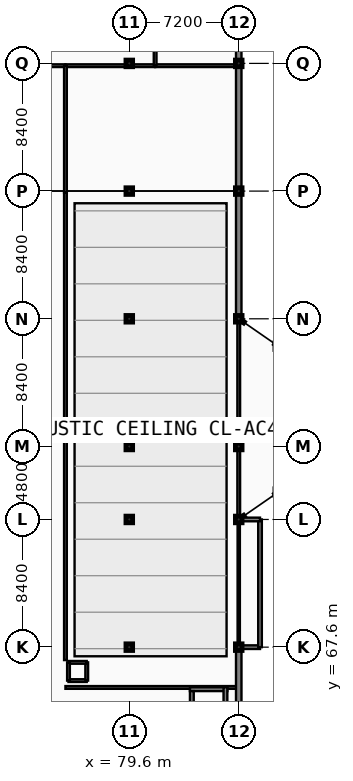
"""IFC4 building model, lengths in metres.
Left out: names, types, materials, properties, quantities, classifications, styles, units other than length and angle.
Written with IfcOpenShell. Run it as: python <this file> out.ifc"""

import sys

from ifc_helpers import new_model, si_unit, direction, frame, frame_2d, origin, origin_2d, place, context, subcontext, project, spatial, rectangle, extrude, element, fill, save


model = new_model("IFC4")
c1 = context("Model", 3, precision=1e-05, world=origin(), true_north=direction((0.0, 1.0)))
c2 = subcontext(c1, "Body", "Model", "MODEL_VIEW")
j1 = project(units=[si_unit("LENGTHUNIT", "METRE"), si_unit("PLANEANGLEUNIT", "RADIAN")], contexts=[c1])
p1 = place(None, origin())
s1 = spatial("IfcSite", under=j1, at=p1, CompositionType="ELEMENT")
p2 = place(p1, origin())
s2 = spatial("IfcBuilding", under=s1, at=p2, CompositionType="ELEMENT")
p3 = place(p2, frame((0.0, 0.0, 9.6)))
s3 = spatial("IfcBuildingStorey", under=s2, at=p3, CompositionType="ELEMENT", Elevation=9.6)
for number, where, z_axis, x_axis in (
    (1, (79.6, 67.6, 0.0), (0.0, 0.0, 1.0), (1.0, 0.0, 0.0)),
    (2, (79.6, 76.0, 0.0), (0.0, 0.0, 1.0), (1.0, 0.0, 0.0)),
    (3, (79.6, 80.8, 0.0), (0.0, 0.0, 1.0), (1.0, 0.0, 0.0)),
    (4, (79.6, 89.2, 0.0), (0.0, 0.0, 1.0), (1.0, 0.0, 0.0)),
    (5, (79.6, 97.6, 0.0), (0.0, 0.0, 1.0), (1.0, 0.0, 0.0)),
    (6, (79.6, 106.0, 0.0), (0.0, 0.0, 1.0), (1.0, 0.0, 0.0)),
    (7, (86.8, 67.6, 0.0), (0.0, 0.0, 1.0), (1.0, 0.0, 0.0)),
    (8, (86.8, 76.0, 0.0), (0.0, 0.0, 1.0), (1.0, 0.0, 0.0)),
    (9, (86.8, 80.8, 0.0), (0.0, 0.0, 1.0), (1.0, 0.0, 0.0)),
    (10, (86.8, 89.2, 0.0), (0.0, 0.0, 1.0), (1.0, 0.0, 0.0)),
    (11, (86.8, 97.6, 0.0), (0.0, 0.0, 1.0), (1.0, 0.0, 0.0)),
    (12, (86.8, 106.0, 0.0), (0.0, 0.0, 1.0), (1.0, 0.0, 0.0)),
):
    element("IfcColumn", number, at=place(p3, frame(where, z_axis=z_axis, x_axis=x_axis)), inside=s3, PredefinedType="COLUMN", context=c2, shape_type="SweptSolid", body=[
        extrude(rectangle(XDim=0.44, YDim=0.44, at=origin_2d()), origin(), (0.0, 0.0, 1.0), 4.2),
    ])
p4 = place(p3, frame((86.8, 67.6, 0.0), z_axis=(0.0, 0.0, 1.0), x_axis=(0.0, 1.0, 0.0)))
e13 = element("IfcWall", 13, at=p4, inside=s3, PredefinedType="PARTITIONING", context=c2, shape_type="SweptSolid", body=[
    extrude(rectangle(XDim=8.4, YDim=0.15, at=frame_2d((4.2, 0.0))), origin(), (0.0, 0.0, 1.0), 3.27),
])
p5 = place(p4, frame((3.7, 0.0, -0.01)))
e14 = element("IfcOpeningElement", 14, at=p5, cuts=e13, PredefinedType="OPENING", context=c2, shape_type="SweptSolid", body=[
    extrude(rectangle(XDim=1.0, YDim=2.16, at=frame_2d((0.5, 1.08))), frame((0.0, 0.085, 0.0), z_axis=(0.0, -1.0, 0.0), x_axis=(1.0, 0.0, 0.0)), (0.0, 0.0, 1.0), 0.17),
])
p6 = place(p3, frame((60.3, 105.85, 0.0), z_axis=(0.0, 0.0, 1.0), x_axis=(1.0, 0.0, 0.0)))
e15 = element("IfcWall", 15, at=p6, inside=s3, PredefinedType="PARTITIONING", context=c2, shape_type="SweptSolid", body=[
    extrude(rectangle(XDim=15.1, YDim=0.18, at=frame_2d((7.55, 0.0))), origin(), (0.0, 0.0, 1.0), 3.25),
])
p7 = place(p6, frame((7.05, 0.0, -0.01)))
e16 = element("IfcOpeningElement", 16, at=p7, cuts=e15, PredefinedType="OPENING", context=c2, shape_type="SweptSolid", body=[
    extrude(rectangle(XDim=1.0, YDim=2.16, at=frame_2d((0.5, 1.08))), frame((0.0, 0.1, 0.0), z_axis=(0.0, -1.0, 0.0), x_axis=(1.0, 0.0, 0.0)), (0.0, 0.0, 1.0), 0.2),
])
p8 = place(p3, frame((75.4, 105.85, 0.0), z_axis=(0.0, 0.0, 1.0), x_axis=(1.0, 0.0, 0.0)))
e17 = element("IfcWall", 17, at=p8, inside=s3, PredefinedType="PARTITIONING", context=c2, shape_type="SweptSolid", body=[
    extrude(rectangle(XDim=5.9, YDim=0.18, at=frame_2d((2.95, 0.0))), origin(), (0.0, 0.0, 1.0), 3.25),
])
p9 = place(p3, frame((81.3, 105.85, 0.0), z_axis=(0.0, 0.0, 1.0), x_axis=(1.0, 0.0, 0.0)))
e18 = element("IfcWall", 18, at=p9, inside=s3, PredefinedType="PARTITIONING", context=c2, shape_type="SweptSolid", body=[
    extrude(rectangle(XDim=5.36, YDim=0.18, at=frame_2d((2.68, 0.0))), origin(), (0.0, 0.0, 1.0), 3.25),
])
p10 = place(p9, frame((2.18, 0.0, -0.01)))
e19 = element("IfcOpeningElement", 19, at=p10, cuts=e18, PredefinedType="OPENING", context=c2, shape_type="SweptSolid", body=[
    extrude(rectangle(XDim=1.0, YDim=2.16, at=frame_2d((0.5, 1.08))), frame((0.0, 0.1, 0.0), z_axis=(0.0, -1.0, 0.0), x_axis=(1.0, 0.0, 0.0)), (0.0, 0.0, 1.0), 0.2),
])
p11 = place(p3, frame((81.3, 105.85, 0.0), z_axis=(0.0, 0.0, 1.0), x_axis=(0.0, 1.0, 0.0)))
e20 = element("IfcWall", 20, at=p11, inside=s3, PredefinedType="PARTITIONING", context=c2, shape_type="SweptSolid", body=[
    extrude(rectangle(XDim=4.15, YDim=0.18, at=frame_2d((2.075, 0.0))), origin(), (0.0, 0.0, 1.0), 3.25),
])
p12 = place(p11, frame((1.575, 0.0, -0.01)))
e21 = element("IfcOpeningElement", 21, at=p12, cuts=e20, PredefinedType="OPENING", context=c2, shape_type="SweptSolid", body=[
    extrude(rectangle(XDim=1.0, YDim=2.16, at=frame_2d((0.5, 1.08))), frame((0.0, 0.1, 0.0), z_axis=(0.0, -1.0, 0.0), x_axis=(1.0, 0.0, 0.0)), (0.0, 0.0, 1.0), 0.2),
])
p13 = place(p3, frame((75.4, 64.95, 0.0), z_axis=(0.0, 0.0, 1.0), x_axis=(1.0, 0.0, 0.0)))
e22 = element("IfcWall", 22, at=p13, inside=s3, PredefinedType="PARTITIONING", context=c2, shape_type="SweptSolid", body=[
    extrude(rectangle(XDim=11.26, YDim=0.18, at=frame_2d((5.63, 0.0))), origin(), (0.0, 0.0, 1.0), 3.47),
])
p14 = place(p3, frame((75.4, 66.75, 0.0), z_axis=(0.0, 0.0, 1.0), x_axis=(0.0, 1.0, 0.0)))
e23 = element("IfcWall", 23, at=p14, inside=s3, PredefinedType="PARTITIONING", context=c2, shape_type="SweptSolid", body=[
    extrude(rectangle(XDim=30.75, YDim=0.18, at=frame_2d((15.375, 0.0))), origin(), (0.0, 0.0, 1.0), 3.27),
])
p15 = place(p14, frame((6.413, 0.0, -0.01)))
e24 = element("IfcOpeningElement", 24, at=p15, cuts=e23, PredefinedType="OPENING", context=c2, shape_type="SweptSolid", body=[
    extrude(rectangle(XDim=1.6, YDim=2.21, at=frame_2d((0.8, 1.105))), frame((0.0, 0.1, 0.0), z_axis=(0.0, -1.0, 0.0), x_axis=(1.0, 0.0, 0.0)), (0.0, 0.0, 1.0), 0.2),
])
p16 = place(p3, frame((75.4, 97.5, 0.0), z_axis=(0.0, 0.0, 1.0), x_axis=(0.0, 1.0, 0.0)))
e25 = element("IfcWall", 25, at=p16, inside=s3, PredefinedType="PARTITIONING", context=c2, shape_type="SweptSolid", body=[
    extrude(rectangle(XDim=8.35, YDim=0.18, at=frame_2d((4.175, 0.0))), origin(), (0.0, 0.0, 1.0), 3.25),
])
p17 = place(p3, frame((86.8, 76.0, 0.0), z_axis=(0.0, 0.0, 1.0), x_axis=(0.0, 1.0, 0.0)))
e26 = element("IfcWall", 26, at=p17, inside=s3, PredefinedType="PARTITIONING", context=c2, shape_type="SweptSolid", body=[
    extrude(rectangle(XDim=13.2, YDim=0.18, at=frame_2d((6.6, 0.0))), origin(), (0.0, 0.0, 1.0), 3.27),
])
p18 = place(p17, frame((5.8, 0.0, -0.01)))
e27 = element("IfcOpeningElement", 27, at=p18, cuts=e26, PredefinedType="OPENING", context=c2, shape_type="SweptSolid", body=[
    extrude(rectangle(XDim=1.6, YDim=2.21, at=frame_2d((0.8, 1.105))), frame((0.0, 0.1, 0.0), z_axis=(0.0, -1.0, 0.0), x_axis=(1.0, 0.0, 0.0)), (0.0, 0.0, 1.0), 0.2),
])
p19 = place(p3, frame((86.8, 97.6, 0.0), z_axis=(0.0, 0.0, 1.0), x_axis=(0.0, 1.0, 0.0)))
e28 = element("IfcWall", 28, at=p19, inside=s3, PredefinedType="SOLIDWALL", context=c2, shape_type="SweptSolid", body=[
    extrude(rectangle(XDim=8.4, YDim=0.36, at=frame_2d((4.2, 0.0))), origin(), (0.0, 0.0, 1.0), 3.25),
])
p20 = place(p19, frame((0.46, 0.0, 0.75)))
e29 = element("IfcOpeningElement", 29, at=p20, cuts=e28, PredefinedType="OPENING", context=c2, shape_type="SweptSolid", body=[
    extrude(rectangle(XDim=1.55, YDim=2.36, at=frame_2d((0.775, 1.18))), frame((0.0, 0.19, 0.0), z_axis=(0.0, -1.0, 0.0), x_axis=(1.0, 0.0, 0.0)), (0.0, 0.0, 1.0), 0.38),
])
p21 = place(p19, frame((6.26, 0.0, 0.75)))
e30 = element("IfcOpeningElement", 30, at=p21, cuts=e28, PredefinedType="OPENING", context=c2, shape_type="SweptSolid", body=[
    extrude(rectangle(XDim=1.55, YDim=2.36, at=frame_2d((0.775, 1.18))), frame((0.0, 0.19, 0.0), z_axis=(0.0, -1.0, 0.0), x_axis=(1.0, 0.0, 0.0)), (0.0, 0.0, 1.0), 0.38),
])
p22 = place(p3, frame((86.8, 106.0, 0.0), z_axis=(0.0, 0.0, 1.0), x_axis=(0.0, 1.0, 0.0)))
e31 = element("IfcWall", 31, at=p22, inside=s3, PredefinedType="SOLIDWALL", context=c2, shape_type="SweptSolid", body=[
    extrude(rectangle(XDim=9.0, YDim=0.36, at=frame_2d((4.5, 0.0))), origin(), (0.0, 0.0, 1.0), 3.25),
])
p23 = place(p22, frame((0.46, 0.0, 0.75)))
e32 = element("IfcOpeningElement", 32, at=p23, cuts=e31, PredefinedType="OPENING", context=c2, shape_type="SweptSolid", body=[
    extrude(rectangle(XDim=1.55, YDim=2.36, at=frame_2d((0.775, 1.18))), frame((0.0, 0.19, 0.0), z_axis=(0.0, -1.0, 0.0), x_axis=(1.0, 0.0, 0.0)), (0.0, 0.0, 1.0), 0.38),
])
p24 = place(p22, frame((6.86, 0.0, 0.75)))
e33 = element("IfcOpeningElement", 33, at=p24, cuts=e31, PredefinedType="OPENING", context=c2, shape_type="SweptSolid", body=[
    extrude(rectangle(XDim=1.55, YDim=2.36, at=frame_2d((0.775, 1.18))), frame((0.0, 0.19, 0.0), z_axis=(0.0, -1.0, 0.0), x_axis=(1.0, 0.0, 0.0)), (0.0, 0.0, 1.0), 0.38),
])
p25 = place(p3, frame((86.8, 59.2, 0.0), z_axis=(0.0, 0.0, 1.0), x_axis=(0.0, 1.0, 0.0)))
e34 = element("IfcWall", 34, at=p25, inside=s3, PredefinedType="SOLIDWALL", context=c2, shape_type="SweptSolid", body=[
    extrude(rectangle(XDim=8.4, YDim=0.36, at=frame_2d((4.2, 0.0))), origin(), (0.0, 0.0, 1.0), 3.27),
])
p26 = place(p25, frame((0.46, 0.0, 0.75)))
e35 = element("IfcOpeningElement", 35, at=p26, cuts=e34, PredefinedType="OPENING", context=c2, shape_type="SweptSolid", body=[
    extrude(rectangle(XDim=1.55, YDim=2.38, at=frame_2d((0.775, 1.19))), frame((0.0, 0.19, 0.0), z_axis=(0.0, -1.0, 0.0), x_axis=(1.0, 0.0, 0.0)), (0.0, 0.0, 1.0), 0.38),
])
p27 = place(p25, frame((6.26, 0.0, 0.75)))
e36 = element("IfcOpeningElement", 36, at=p27, cuts=e34, PredefinedType="OPENING", context=c2, shape_type="SweptSolid", body=[
    extrude(rectangle(XDim=1.55, YDim=2.38, at=frame_2d((0.775, 1.19))), frame((0.0, 0.19, 0.0), z_axis=(0.0, -1.0, 0.0), x_axis=(1.0, 0.0, 0.0)), (0.0, 0.0, 1.0), 0.38),
])
p28 = place(p3, frame((86.8, 89.2, 0.0), z_axis=(0.0, 0.0, 1.0), x_axis=(0.0, 1.0, 0.0)))
e37 = element("IfcWall", 37, at=p28, inside=s3, PredefinedType="SOLIDWALL", context=c2, shape_type="SweptSolid", body=[
    extrude(rectangle(XDim=8.4, YDim=0.36, at=frame_2d((4.2, 0.0))), origin(), (0.0, 0.0, 1.0), 3.27),
])
p29 = place(p28, frame((0.46, 0.0, 0.75)))
e38 = element("IfcOpeningElement", 38, at=p29, cuts=e37, PredefinedType="OPENING", context=c2, shape_type="SweptSolid", body=[
    extrude(rectangle(XDim=1.55, YDim=2.38, at=frame_2d((0.775, 1.19))), frame((0.0, 0.19, 0.0), z_axis=(0.0, -1.0, 0.0), x_axis=(1.0, 0.0, 0.0)), (0.0, 0.0, 1.0), 0.38),
])
p30 = place(p28, frame((6.26, 0.0, 0.75)))
e39 = element("IfcOpeningElement", 39, at=p30, cuts=e37, PredefinedType="OPENING", context=c2, shape_type="SweptSolid", body=[
    extrude(rectangle(XDim=1.55, YDim=2.38, at=frame_2d((0.775, 1.19))), frame((0.0, 0.19, 0.0), z_axis=(0.0, -1.0, 0.0), x_axis=(1.0, 0.0, 0.0)), (0.0, 0.0, 1.0), 0.38),
])
for number, where, z_axis, x_axis in (
    (40, (87.03, 76.159, 0.0), (0.0, 0.0, 1.0), (0.822, 0.569, 0.0)),
    (41, (87.211, 88.915, 0.0), (0.0, 0.0, 1.0), (-0.822, 0.569, 0.0)),
):
    element("IfcWall", number, at=place(p3, frame(where, z_axis=z_axis, x_axis=x_axis)), inside=s3, PredefinedType="SOLIDWALL", context=c2, shape_type="SweptSolid", body=[
        extrude(rectangle(XDim=0.22, YDim=0.24, at=frame_2d((0.11, 0.0))), origin(), (0.0, 0.0, 1.0), 3.27),
    ])
p31 = place(p3, frame((86.8, 67.6, 0.0), z_axis=(0.0, 0.0, 1.0), x_axis=(1.0, 0.0, 0.0)))
e42 = element("IfcWall", 42, at=p31, inside=s3, PredefinedType="SOLIDWALL", context=c2, shape_type="SweptSolid", body=[
    extrude(rectangle(XDim=1.4, YDim=0.24, at=frame_2d((0.7, 0.0))), origin(), (0.0, 0.0, 1.0), 3.27),
])
p32 = place(p3, frame((88.2, 67.6, 0.0), z_axis=(0.0, 0.0, 1.0), x_axis=(0.0, 1.0, 0.0)))
e43 = element("IfcWall", 43, at=p32, inside=s3, PredefinedType="SOLIDWALL", context=c2, shape_type="SweptSolid", body=[
    extrude(rectangle(XDim=8.4, YDim=0.24, at=frame_2d((4.2, 0.0))), origin(), (0.0, 0.0, 1.0), 3.27),
])
p33 = place(p32, frame((0.46, 0.0, 0.65)))
e44 = element("IfcOpeningElement", 44, at=p33, cuts=e43, PredefinedType="OPENING", context=c2, shape_type="SweptSolid", body=[
    extrude(rectangle(XDim=2.4, YDim=2.2, at=frame_2d((1.2, 1.1))), frame((0.0, 0.13, 0.0), z_axis=(0.0, -1.0, 0.0), x_axis=(1.0, 0.0, 0.0)), (0.0, 0.0, 1.0), 0.26),
])
p34 = place(p32, frame((5.46, 0.0, 0.65)))
e45 = element("IfcOpeningElement", 45, at=p34, cuts=e43, PredefinedType="OPENING", context=c2, shape_type="SweptSolid", body=[
    extrude(rectangle(XDim=2.4, YDim=2.2, at=frame_2d((1.2, 1.1))), frame((0.0, 0.13, 0.0), z_axis=(0.0, -1.0, 0.0), x_axis=(1.0, 0.0, 0.0)), (0.0, 0.0, 1.0), 0.26),
])
p35 = place(p3, frame((88.2, 76.0, 0.0), z_axis=(0.0, 0.0, 1.0), x_axis=(-1.0, 0.0, 0.0)))
e46 = element("IfcWall", 46, at=p35, inside=s3, PredefinedType="SOLIDWALL", context=c2, shape_type="SweptSolid", body=[
    extrude(rectangle(XDim=1.4, YDim=0.24, at=frame_2d((0.7, 0.0))), origin(), (0.0, 0.0, 1.0), 3.27),
])
p36 = place(p3, frame((83.59, 64.835, 0.0), z_axis=(0.0, 0.0, 1.0), x_axis=(1.0, 0.0, 0.0)))
e47 = element("IfcWall", 47, at=p36, inside=s3, PredefinedType="SHEAR", context=c2, shape_type="SweptSolid", body=[
    extrude(rectangle(XDim=2.46, YDim=0.25, at=frame_2d((1.23, 0.0))), origin(), (0.0, 0.0, 1.0), 4.2),
])
p37 = place(p3, frame((83.715, 62.25, 0.0), z_axis=(0.0, 0.0, 1.0), x_axis=(0.0, 1.0, 0.0)))
e48 = element("IfcWall", 48, at=p37, inside=s3, PredefinedType="SHEAR", context=c2, shape_type="SweptSolid", body=[
    extrude(rectangle(XDim=2.46, YDim=0.25, at=frame_2d((1.23, 0.0))), origin(), (0.0, 0.0, 1.0), 4.2),
])
p38 = place(p37, frame((0.68, 0.0, -0.01)))
e49 = element("IfcOpeningElement", 49, at=p38, cuts=e48, PredefinedType="OPENING", context=c2, shape_type="SweptSolid", body=[
    extrude(rectangle(XDim=1.1, YDim=2.16, at=frame_2d((0.55, 1.08))), frame((0.0, 0.135, 0.0), z_axis=(0.0, -1.0, 0.0), x_axis=(1.0, 0.0, 0.0)), (0.0, 0.0, 1.0), 0.27),
])
p39 = place(p3, frame((85.925, 62.25, 0.0), z_axis=(0.0, 0.0, 1.0), x_axis=(0.0, 1.0, 0.0)))
e50 = element("IfcWall", 50, at=p39, inside=s3, PredefinedType="SHEAR", context=c2, shape_type="SweptSolid", body=[
    extrude(rectangle(XDim=2.71, YDim=0.25, at=frame_2d((1.355, 0.0))), origin(), (0.0, 0.0, 1.0), 4.2),
])
p40 = place(p3, frame((75.6, 65.4, 0.0), z_axis=(0.0, 0.0, 1.0), x_axis=(1.0, 0.0, 0.0)))
e51 = element("IfcWall", 51, at=p40, inside=s3, PredefinedType="SOLIDWALL", context=c2, shape_type="SweptSolid", body=[
    extrude(rectangle(XDim=1.2, YDim=0.18, at=frame_2d((0.6, 0.0))), origin(), (0.0, 0.0, 1.0), 3.97),
])
p41 = place(p3, frame((76.8, 65.4, 0.0), z_axis=(0.0, 0.0, 1.0), x_axis=(0.0, 1.0, 0.0)))
e52 = element("IfcWall", 52, at=p41, inside=s3, PredefinedType="SOLIDWALL", context=c2, shape_type="SweptSolid", body=[
    extrude(rectangle(XDim=1.2, YDim=0.18, at=frame_2d((0.6, 0.0))), origin(), (0.0, 0.0, 1.0), 3.97),
])
p42 = place(p3, frame((76.8, 66.6, 0.0), z_axis=(0.0, 0.0, 1.0), x_axis=(-1.0, 0.0, 0.0)))
e53 = element("IfcWall", 53, at=p42, inside=s3, PredefinedType="SOLIDWALL", context=c2, shape_type="SweptSolid", body=[
    extrude(rectangle(XDim=1.2, YDim=0.18, at=frame_2d((0.6, 0.0))), origin(), (0.0, 0.0, 1.0), 3.97),
])
p43 = place(p3, frame((75.6, 66.6, 0.0), z_axis=(0.0, 0.0, 1.0), x_axis=(0.0, -1.0, 0.0)))
e54 = element("IfcWall", 54, at=p43, inside=s3, PredefinedType="SOLIDWALL", context=c2, shape_type="SweptSolid", body=[
    extrude(rectangle(XDim=1.2, YDim=0.18, at=frame_2d((0.6, 0.0))), origin(), (0.0, 0.0, 1.0), 3.97),
])
p44 = place(p43, frame((0.2, 0.0, -0.01)))
e55 = element("IfcOpeningElement", 55, at=p44, cuts=e54, PredefinedType="OPENING", context=c2, shape_type="SweptSolid", body=[
    extrude(rectangle(XDim=0.8, YDim=2.06, at=frame_2d((0.4, 1.03))), frame((0.0, 0.1, 0.0), z_axis=(0.0, -1.0, 0.0), x_axis=(1.0, 0.0, 0.0)), (0.0, 0.0, 1.0), 0.2),
])
p45 = place(p5, frame((0.0, 0.0, 0.01)))
e56 = element("IfcDoor", 56, at=p45, inside=s3, OperationType="SINGLE_SWING_RIGHT", PredefinedType="DOOR", context=c2, shape_type="SweptSolid", body=[
    extrude(rectangle(XDim=1.0, YDim=2.15, at=frame_2d((0.5, 1.075))), frame((0.0, 0.025, 0.0), z_axis=(0.0, -1.0, 0.0), x_axis=(1.0, 0.0, 0.0)), (0.0, 0.0, 1.0), 0.05),
])
fill(e14, e56)
p46 = place(p10, frame((0.0, 0.0, 0.01)))
e57 = element("IfcDoor", 57, at=p46, inside=s3, OperationType="SINGLE_SWING_RIGHT", PredefinedType="DOOR", context=c2, shape_type="SweptSolid", body=[
    extrude(rectangle(XDim=1.0, YDim=2.15, at=frame_2d((0.5, 1.075))), frame((0.0, 0.025, 0.0), z_axis=(0.0, -1.0, 0.0), x_axis=(1.0, 0.0, 0.0)), (0.0, 0.0, 1.0), 0.05),
])
fill(e19, e57)
p47 = place(p15, frame((0.0, 0.0, 0.01)))
e58 = element("IfcDoor", 58, at=p47, inside=s3, OperationType="DOUBLE_SWING_LEFT", PredefinedType="DOOR", context=c2, shape_type="SweptSolid", body=[
    extrude(rectangle(XDim=1.6, YDim=2.2, at=frame_2d((0.8, 1.1))), frame((0.0, 0.025, 0.0), z_axis=(0.0, -1.0, 0.0), x_axis=(1.0, 0.0, 0.0)), (0.0, 0.0, 1.0), 0.05),
])
fill(e24, e58)
p48 = place(p18, frame((1.6, 0.0, 0.01), z_axis=(0.0, 0.0, 1.0), x_axis=(-1.0, 0.0, 0.0)))
e59 = element("IfcDoor", 59, at=p48, inside=s3, OperationType="DOUBLE_SWING_LEFT", PredefinedType="DOOR", context=c2, shape_type="SweptSolid", body=[
    extrude(rectangle(XDim=1.6, YDim=2.2, at=frame_2d((0.8, 1.1))), frame((0.0, 0.025, 0.0), z_axis=(0.0, -1.0, 0.0), x_axis=(1.0, 0.0, 0.0)), (0.0, 0.0, 1.0), 0.05),
])
fill(e27, e59)
p49 = place(p20, origin())
e60 = element("IfcWindow", 60, at=p49, inside=s3, PartitioningType="DOUBLE_PANEL_HORIZONTAL", PredefinedType="WINDOW", context=c2, shape_type="SweptSolid", body=[
    extrude(rectangle(XDim=1.55, YDim=2.36, at=frame_2d((0.775, 1.18))), frame((0.0, 0.03, 0.0), z_axis=(0.0, -1.0, 0.0), x_axis=(1.0, 0.0, 0.0)), (0.0, 0.0, 1.0), 0.06),
])
fill(e29, e60)
p50 = place(p21, origin())
e61 = element("IfcWindow", 61, at=p50, inside=s3, PartitioningType="DOUBLE_PANEL_HORIZONTAL", PredefinedType="WINDOW", context=c2, shape_type="SweptSolid", body=[
    extrude(rectangle(XDim=1.55, YDim=2.36, at=frame_2d((0.775, 1.18))), frame((0.0, 0.03, 0.0), z_axis=(0.0, -1.0, 0.0), x_axis=(1.0, 0.0, 0.0)), (0.0, 0.0, 1.0), 0.06),
])
fill(e30, e61)
p51 = place(p23, origin())
e62 = element("IfcWindow", 62, at=p51, inside=s3, PartitioningType="DOUBLE_PANEL_HORIZONTAL", PredefinedType="WINDOW", context=c2, shape_type="SweptSolid", body=[
    extrude(rectangle(XDim=1.55, YDim=2.36, at=frame_2d((0.775, 1.18))), frame((0.0, 0.03, 0.0), z_axis=(0.0, -1.0, 0.0), x_axis=(1.0, 0.0, 0.0)), (0.0, 0.0, 1.0), 0.06),
])
fill(e32, e62)
p52 = place(p27, origin())
e63 = element("IfcWindow", 63, at=p52, inside=s3, PartitioningType="DOUBLE_PANEL_HORIZONTAL", PredefinedType="WINDOW", context=c2, shape_type="SweptSolid", body=[
    extrude(rectangle(XDim=1.55, YDim=2.38, at=frame_2d((0.775, 1.19))), frame((0.0, 0.03, 0.0), z_axis=(0.0, -1.0, 0.0), x_axis=(1.0, 0.0, 0.0)), (0.0, 0.0, 1.0), 0.06),
])
fill(e36, e63)
p53 = place(p29, origin())
e64 = element("IfcWindow", 64, at=p53, inside=s3, PartitioningType="DOUBLE_PANEL_HORIZONTAL", PredefinedType="WINDOW", context=c2, shape_type="SweptSolid", body=[
    extrude(rectangle(XDim=1.55, YDim=2.38, at=frame_2d((0.775, 1.19))), frame((0.0, 0.03, 0.0), z_axis=(0.0, -1.0, 0.0), x_axis=(1.0, 0.0, 0.0)), (0.0, 0.0, 1.0), 0.06),
])
fill(e38, e64)
p54 = place(p30, origin())
e65 = element("IfcWindow", 65, at=p54, inside=s3, PartitioningType="DOUBLE_PANEL_HORIZONTAL", PredefinedType="WINDOW", context=c2, shape_type="SweptSolid", body=[
    extrude(rectangle(XDim=1.55, YDim=2.38, at=frame_2d((0.775, 1.19))), frame((0.0, 0.03, 0.0), z_axis=(0.0, -1.0, 0.0), x_axis=(1.0, 0.0, 0.0)), (0.0, 0.0, 1.0), 0.06),
])
fill(e39, e65)
p55 = place(p33, origin())
e66 = element("IfcWindow", 66, at=p55, inside=s3, PartitioningType="TRIPLE_PANEL_VERTICAL", PredefinedType="WINDOW", context=c2, shape_type="SweptSolid", body=[
    extrude(rectangle(XDim=2.4, YDim=2.2, at=frame_2d((1.2, 1.1))), frame((0.0, 0.03, 0.0), z_axis=(0.0, -1.0, 0.0), x_axis=(1.0, 0.0, 0.0)), (0.0, 0.0, 1.0), 0.06),
])
fill(e44, e66)
p56 = place(p34, origin())
e67 = element("IfcWindow", 67, at=p56, inside=s3, PartitioningType="TRIPLE_PANEL_VERTICAL", PredefinedType="WINDOW", context=c2, shape_type="SweptSolid", body=[
    extrude(rectangle(XDim=2.4, YDim=2.2, at=frame_2d((1.2, 1.1))), frame((0.0, 0.03, 0.0), z_axis=(0.0, -1.0, 0.0), x_axis=(1.0, 0.0, 0.0)), (0.0, 0.0, 1.0), 0.06),
])
fill(e45, e67)
p57 = place(p44, frame((0.0, 0.0, 0.01)))
e68 = element("IfcDoor", 68, at=p57, inside=s3, OperationType="SINGLE_SWING_LEFT", PredefinedType="DOOR", context=c2, shape_type="SweptSolid", body=[
    extrude(rectangle(XDim=0.8, YDim=2.05, at=frame_2d((0.4, 1.025))), frame((0.0, 0.025, 0.0), z_axis=(0.0, -1.0, 0.0), x_axis=(1.0, 0.0, 0.0)), (0.0, 0.0, 1.0), 0.05),
])
fill(e55, e68)
save(model, sys.argv[1])
